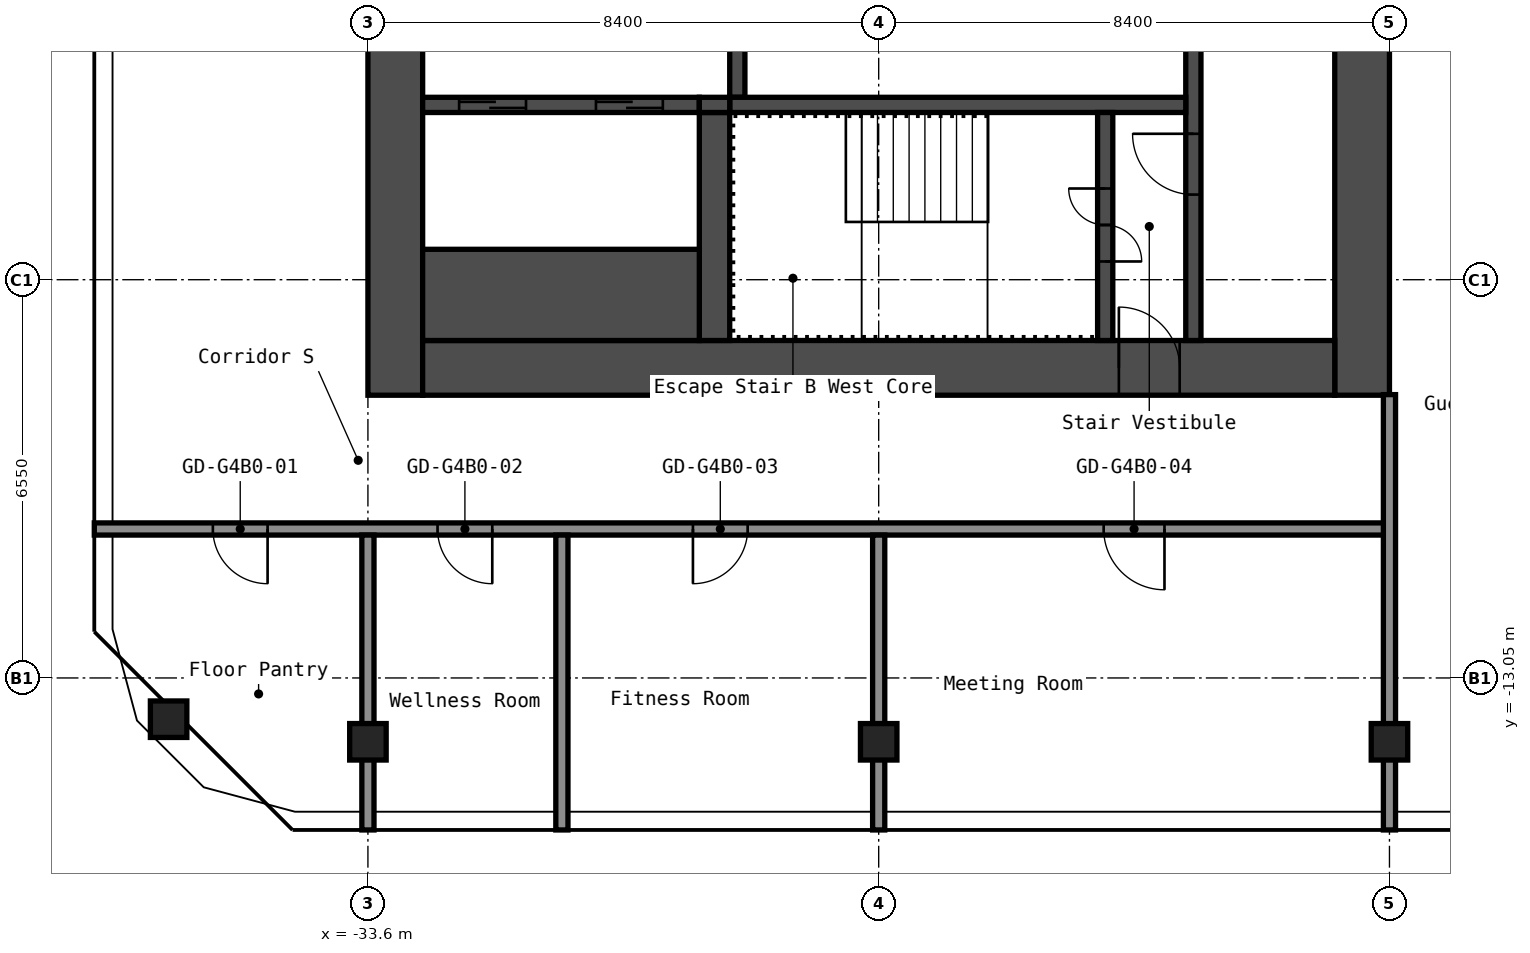
"""IFC4 building model, lengths in metres.
Left out: names, types, materials, properties, quantities, classifications, styles, units other than length and angle.
Written with IfcOpenShell. Run it as: python <this file> out.ifc"""

import sys

from ifc_helpers import new_model, si_unit, direction, frame, frame_2d, origin, origin_2d, place, context, subcontext, project, spatial, rectangle, hollow_rectangle, extrude, element, fill, save


model = new_model("IFC4")
c1 = context("Model", 3, precision=1e-05, world=origin(), true_north=direction((0.0, 1.0)))
c2 = subcontext(c1, "Body", "Model", "MODEL_VIEW")
j1 = project(units=[si_unit("LENGTHUNIT", "METRE"), si_unit("PLANEANGLEUNIT", "RADIAN")], contexts=[c1])
p1 = place(None, origin())
s1 = spatial("IfcSite", under=j1, at=p1, CompositionType="ELEMENT")
p2 = place(p1, origin())
s2 = spatial("IfcBuilding", under=s1, at=p2, CompositionType="ELEMENT")
p3 = place(p2, frame((0.0, 0.0, 189.8)))
s3 = spatial("IfcBuildingStorey", under=s2, at=p3, CompositionType="ELEMENT", Elevation=189.8)
for number, where, z_axis, x_axis in (
    (1, (-36.878, -13.729, 0.0), (0.0, 0.0, 1.0), (1.0, 0.0, 0.0)),
    (2, (-33.6, -14.1, 0.0), (0.0, 0.0, 1.0), (1.0, 0.0, 0.0)),
    (3, (-25.2, -14.1, 0.0), (0.0, 0.0, 1.0), (1.0, 0.0, 0.0)),
    (4, (-16.8, -14.1, 0.0), (0.0, 0.0, 1.0), (1.0, 0.0, 0.0)),
):
    element("IfcColumn", number, at=place(p3, frame(where, z_axis=z_axis, x_axis=x_axis)), inside=s3, PredefinedType="COLUMN", context=c2, shape_type="SweptSolid", body=[
        extrude(hollow_rectangle(XDim=0.6, YDim=0.6, WallThickness=0.025, InnerFilletRadius=0.038, OuterFilletRadius=0.062, at=origin_2d()), origin(), (0.0, 0.0, 1.0), 2.75),
    ])
p4 = place(p3, frame((-17.25, -8.4, 0.0), z_axis=(0.0, 0.0, 1.0), x_axis=(0.0, 1.0, 0.0)))
e5 = element("IfcWall", 5, at=p4, inside=s3, PredefinedType="SHEAR", context=c2, shape_type="SweptSolid", body=[
    extrude(rectangle(XDim=16.8, YDim=0.9, at=frame_2d((8.4, 0.0))), origin(), (0.0, 0.0, 1.0), 2.75),
])
p5 = place(p4, frame((10.1, 0.0, 0.0)))
e6 = element("IfcOpeningElement", 6, at=p5, cuts=e5, PredefinedType="OPENING", context=c2, shape_type="SweptSolid", body=[
    extrude(rectangle(XDim=1.6, YDim=2.1, at=frame_2d((0.8, 1.05))), frame((0.0, 0.46, 0.0), z_axis=(0.0, -1.0, 0.0), x_axis=(1.0, 0.0, 0.0)), (0.0, 0.0, 1.0), 0.92),
])
p6 = place(p3, frame((-33.15, -8.4, 0.0), z_axis=(0.0, 0.0, 1.0), x_axis=(0.0, 1.0, 0.0)))
e7 = element("IfcWall", 7, at=p6, inside=s3, PredefinedType="SHEAR", context=c2, shape_type="SweptSolid", body=[
    extrude(rectangle(XDim=16.8, YDim=0.9, at=frame_2d((8.4, 0.0))), origin(), (0.0, 0.0, 1.0), 2.75),
])
p7 = place(p3, frame((-32.7, -7.95, 0.0), z_axis=(0.0, 0.0, 1.0), x_axis=(1.0, 0.0, 0.0)))
e8 = element("IfcWall", 8, at=p7, inside=s3, PredefinedType="SHEAR", context=c2, shape_type="SweptSolid", body=[
    extrude(rectangle(XDim=15.0, YDim=0.9, at=frame_2d((7.5, 0.0))), origin(), (0.0, 0.0, 1.0), 2.75),
])
p8 = place(p7, frame((11.45, 0.0, 0.0)))
e9 = element("IfcOpeningElement", 9, at=p8, cuts=e8, PredefinedType="OPENING", context=c2, shape_type="SweptSolid", body=[
    extrude(rectangle(XDim=1.0, YDim=2.1, at=frame_2d((0.5, 1.05))), frame((0.0, 0.46, 0.0), z_axis=(0.0, -1.0, 0.0), x_axis=(1.0, 0.0, 0.0)), (0.0, 0.0, 1.0), 0.92),
])
p9 = place(p3, frame((-20.025, -7.5, 0.0), z_axis=(0.0, 0.0, 1.0), x_axis=(0.0, 1.0, 0.0)))
e10 = element("IfcWall", 10, at=p9, inside=s3, PredefinedType="SHEAR", context=c2, shape_type="SweptSolid", body=[
    extrude(rectangle(XDim=6.3, YDim=0.25, at=frame_2d((3.15, 0.0))), origin(), (0.0, 0.0, 1.0), 2.75),
])
p10 = place(p9, frame((2.4, 0.0, 0.0)))
e11 = element("IfcOpeningElement", 11, at=p10, cuts=e10, PredefinedType="OPENING", context=c2, shape_type="SweptSolid", body=[
    extrude(rectangle(XDim=1.0, YDim=2.1, at=frame_2d((0.5, 1.05))), frame((0.0, 0.135, 0.0), z_axis=(0.0, -1.0, 0.0), x_axis=(1.0, 0.0, 0.0)), (0.0, 0.0, 1.0), 0.27),
])
p11 = place(p3, frame((-27.525, -3.5, 0.0), z_axis=(0.0, 0.0, 1.0), x_axis=(0.0, 1.0, 0.0)))
e12 = element("IfcWall", 12, at=p11, inside=s3, PredefinedType="SHEAR", context=c2, shape_type="SweptSolid", body=[
    extrude(rectangle(XDim=2.05, YDim=0.25, at=frame_2d((1.025, 0.0))), origin(), (0.0, 0.0, 1.0), 2.75),
])
p12 = place(p3, frame((-27.65, -3.625, 0.0), z_axis=(0.0, 0.0, 1.0), x_axis=(1.0, 0.0, 0.0)))
e13 = element("IfcWall", 13, at=p12, inside=s3, PredefinedType="SHEAR", context=c2, shape_type="SweptSolid", body=[
    extrude(rectangle(XDim=7.5, YDim=0.25, at=frame_2d((3.75, 0.0))), origin(), (0.0, 0.0, 1.0), 2.75),
])
p13 = place(p3, frame((-21.475, -7.5, 0.0), z_axis=(0.0, 0.0, 1.0), x_axis=(0.0, 1.0, 0.0)))
e14 = element("IfcWall", 14, at=p13, inside=s3, PredefinedType="SHEAR", context=c2, shape_type="SweptSolid", body=[
    extrude(rectangle(XDim=3.75, YDim=0.25, at=frame_2d((1.875, 0.0))), origin(), (0.0, 0.0, 1.0), 2.75),
])
p14 = place(p13, frame((1.3, 0.0, 0.0)))
e15 = element("IfcOpeningElement", 15, at=p14, cuts=e14, PredefinedType="OPENING", context=c2, shape_type="SweptSolid", body=[
    extrude(rectangle(XDim=1.2, YDim=2.1, at=frame_2d((0.6, 1.05))), frame((0.0, 0.135, 0.0), z_axis=(0.0, -1.0, 0.0), x_axis=(1.0, 0.0, 0.0)), (0.0, 0.0, 1.0), 0.27),
])
p15 = place(p3, frame((-27.9, -7.5, 0.0), z_axis=(0.0, 0.0, 1.0), x_axis=(0.0, 1.0, 0.0)))
e16 = element("IfcWall", 16, at=p15, inside=s3, PredefinedType="SHEAR", context=c2, shape_type="SweptSolid", body=[
    extrude(rectangle(XDim=3.75, YDim=0.5, at=frame_2d((1.875, 0.0))), origin(), (0.0, 0.0, 1.0), 2.75),
])
p16 = place(p3, frame((-32.7, -3.625, 0.0), z_axis=(0.0, 0.0, 1.0), x_axis=(1.0, 0.0, 0.0)))
e17 = element("IfcWall", 17, at=p16, inside=s3, PredefinedType="SHEAR", context=c2, shape_type="SweptSolid", body=[
    extrude(rectangle(XDim=4.55, YDim=0.25, at=frame_2d((2.275, 0.0))), origin(), (0.0, 0.0, 1.0), 2.75),
])
p17 = place(p16, frame((2.85, 0.0, 0.0)))
e18 = element("IfcOpeningElement", 18, at=p17, cuts=e17, PredefinedType="OPENING", context=c2, shape_type="SweptSolid", body=[
    extrude(rectangle(XDim=1.1, YDim=2.1, at=frame_2d((0.55, 1.05))), frame((0.0, 0.135, 0.0), z_axis=(0.0, -1.0, 0.0), x_axis=(1.0, 0.0, 0.0)), (0.0, 0.0, 1.0), 0.27),
])
p18 = place(p16, frame((0.6, 0.0, 0.0)))
e19 = element("IfcOpeningElement", 19, at=p18, cuts=e17, PredefinedType="OPENING", context=c2, shape_type="SweptSolid", body=[
    extrude(rectangle(XDim=1.1, YDim=2.1, at=frame_2d((0.55, 1.05))), frame((0.0, 0.135, 0.0), z_axis=(0.0, -1.0, 0.0), x_axis=(1.0, 0.0, 0.0)), (0.0, 0.0, 1.0), 0.27),
])
p19 = place(p3, frame((-32.7, -6.75, 0.0), z_axis=(0.0, 0.0, 1.0), x_axis=(1.0, 0.0, 0.0)))
e20 = element("IfcWall", 20, at=p19, inside=s3, PredefinedType="SHEAR", context=c2, shape_type="SweptSolid", body=[
    extrude(rectangle(XDim=4.55, YDim=1.5, at=frame_2d((2.275, 0.0))), origin(), (0.0, 0.0, 1.0), 2.75),
])
p20 = place(p3, frame((-28.15, -3.625, 0.0), z_axis=(0.0, 0.0, 1.0), x_axis=(1.0, 0.0, 0.0)))
e21 = element("IfcWall", 21, at=p20, inside=s3, PredefinedType="SHEAR", context=c2, shape_type="SweptSolid", body=[
    extrude(rectangle(XDim=0.5, YDim=0.25, at=frame_2d((0.25, 0.0))), origin(), (0.0, 0.0, 1.0), 2.75),
])
p21 = place(p3, frame((-38.1, -10.6, 0.0), z_axis=(0.0, 0.0, 1.0), x_axis=(1.0, 0.0, 0.0)))
e22 = element("IfcWall", 22, at=p21, inside=s3, PredefinedType="PARTITIONING", context=c2, shape_type="SweptSolid", body=[
    extrude(rectangle(XDim=21.3, YDim=0.2, at=frame_2d((10.65, 0.0))), origin(), (0.0, 0.0, 1.0), 2.75),
])
p22 = place(p21, frame((1.95, 0.0, 0.0)))
e23 = element("IfcOpeningElement", 23, at=p22, cuts=e22, PredefinedType="OPENING", context=c2, shape_type="SweptSolid", body=[
    extrude(rectangle(XDim=0.9, YDim=2.1, at=frame_2d((0.45, 1.05))), frame((0.0, 0.11, 0.0), z_axis=(0.0, -1.0, 0.0), x_axis=(1.0, 0.0, 0.0)), (0.0, 0.0, 1.0), 0.22),
])
p23 = place(p21, frame((5.645, 0.0, 0.0)))
e24 = element("IfcOpeningElement", 24, at=p23, cuts=e22, PredefinedType="OPENING", context=c2, shape_type="SweptSolid", body=[
    extrude(rectangle(XDim=0.9, YDim=2.1, at=frame_2d((0.45, 1.05))), frame((0.0, 0.11, 0.0), z_axis=(0.0, -1.0, 0.0), x_axis=(1.0, 0.0, 0.0)), (0.0, 0.0, 1.0), 0.22),
])
p24 = place(p21, frame((9.845, 0.0, 0.0)))
e25 = element("IfcOpeningElement", 25, at=p24, cuts=e22, PredefinedType="OPENING", context=c2, shape_type="SweptSolid", body=[
    extrude(rectangle(XDim=0.9, YDim=2.1, at=frame_2d((0.45, 1.05))), frame((0.0, 0.11, 0.0), z_axis=(0.0, -1.0, 0.0), x_axis=(1.0, 0.0, 0.0)), (0.0, 0.0, 1.0), 0.22),
])
p25 = place(p21, frame((16.6, 0.0, 0.0)))
e26 = element("IfcOpeningElement", 26, at=p25, cuts=e22, PredefinedType="OPENING", context=c2, shape_type="SweptSolid", body=[
    extrude(rectangle(XDim=1.0, YDim=2.1, at=frame_2d((0.5, 1.05))), frame((0.0, 0.11, 0.0), z_axis=(0.0, -1.0, 0.0), x_axis=(1.0, 0.0, 0.0)), (0.0, 0.0, 1.0), 0.22),
])
for number, where, z_axis, x_axis in (
    (27, (-33.6, -15.55, 0.0), (0.0, 0.0, 1.0), (0.0, 1.0, 0.0)),
    (28, (-30.41, -15.55, 0.0), (0.0, 0.0, 1.0), (0.0, 1.0, 0.0)),
    (29, (-25.2, -15.55, 0.0), (0.0, 0.0, 1.0), (0.0, 1.0, 0.0)),
):
    element("IfcWall", number, at=place(p3, frame(where, z_axis=z_axis, x_axis=x_axis)), inside=s3, PredefinedType="PARTITIONING", context=c2, shape_type="SweptSolid", body=[
        extrude(rectangle(XDim=4.85, YDim=0.2, at=frame_2d((2.425, 0.0))), origin(), (0.0, 0.0, 1.0), 2.75),
    ])
p26 = place(p3, frame((-16.8, -15.55, 0.0), z_axis=(0.0, 0.0, 1.0), x_axis=(0.0, 1.0, 0.0)))
e30 = element("IfcWall", 30, at=p26, inside=s3, PredefinedType="PARTITIONING", context=c2, shape_type="SweptSolid", body=[
    extrude(rectangle(XDim=7.16, YDim=0.2, at=frame_2d((3.58, 0.0))), origin(), (0.0, 0.0, 1.0), 2.75),
])
p27 = place(p8, origin())
e31 = element("IfcDoor", 31, at=p27, inside=s3, OperationType="SINGLE_SWING_RIGHT", PredefinedType="DOOR", context=c2, shape_type="SweptSolid", body=[
    extrude(rectangle(XDim=1.0, YDim=2.1, at=frame_2d((0.5, 1.05))), frame((0.0, 0.025, 0.0), z_axis=(0.0, -1.0, 0.0), x_axis=(1.0, 0.0, 0.0)), (0.0, 0.0, 1.0), 0.05),
])
fill(e9, e31)
p28 = place(p14, origin())
e32 = element("IfcDoor", 32, at=p28, inside=s3, OperationType="DOUBLE_DOOR_SINGLE_SWING", PredefinedType="DOOR", context=c2, shape_type="SweptSolid", body=[
    extrude(rectangle(XDim=1.2, YDim=2.1, at=frame_2d((0.6, 1.05))), frame((0.0, 0.025, 0.0), z_axis=(0.0, -1.0, 0.0), x_axis=(1.0, 0.0, 0.0)), (0.0, 0.0, 1.0), 0.05),
])
fill(e15, e32)
p29 = place(p10, origin())
e33 = element("IfcDoor", 33, at=p29, inside=s3, OperationType="SINGLE_SWING_LEFT", PredefinedType="DOOR", context=c2, shape_type="SweptSolid", body=[
    extrude(rectangle(XDim=1.0, YDim=2.1, at=frame_2d((0.5, 1.05))), frame((0.0, 0.025, 0.0), z_axis=(0.0, -1.0, 0.0), x_axis=(1.0, 0.0, 0.0)), (0.0, 0.0, 1.0), 0.05),
])
fill(e11, e33)
p30 = place(p17, origin())
e34 = element("IfcDoor", 34, at=p30, inside=s3, OperationType="DOUBLE_DOOR_SLIDING", PredefinedType="DOOR", context=c2, shape_type="SweptSolid", body=[
    extrude(rectangle(XDim=1.1, YDim=2.1, at=frame_2d((0.55, 1.05))), frame((0.0, 0.025, 0.0), z_axis=(0.0, -1.0, 0.0), x_axis=(1.0, 0.0, 0.0)), (0.0, 0.0, 1.0), 0.05),
])
fill(e18, e34)
p31 = place(p18, origin())
e35 = element("IfcDoor", 35, at=p31, inside=s3, OperationType="DOUBLE_DOOR_SLIDING", PredefinedType="DOOR", context=c2, shape_type="SweptSolid", body=[
    extrude(rectangle(XDim=1.1, YDim=2.1, at=frame_2d((0.55, 1.05))), frame((0.0, 0.025, 0.0), z_axis=(0.0, -1.0, 0.0), x_axis=(1.0, 0.0, 0.0)), (0.0, 0.0, 1.0), 0.05),
])
fill(e19, e35)
p32 = place(p22, origin())
e36 = element("IfcDoor", 36, at=p32, inside=s3, OperationType="SINGLE_SWING_RIGHT", PredefinedType="DOOR", context=c2, shape_type="SweptSolid", body=[
    extrude(rectangle(XDim=0.9, YDim=2.1, at=frame_2d((0.45, 1.05))), frame((0.0, 0.025, 0.0), z_axis=(0.0, -1.0, 0.0), x_axis=(1.0, 0.0, 0.0)), (0.0, 0.0, 1.0), 0.05),
])
fill(e23, e36)
p33 = place(p23, origin())
e37 = element("IfcDoor", 37, at=p33, inside=s3, OperationType="SINGLE_SWING_RIGHT", PredefinedType="DOOR", context=c2, shape_type="SweptSolid", body=[
    extrude(rectangle(XDim=0.9, YDim=2.1, at=frame_2d((0.45, 1.05))), frame((0.0, 0.025, 0.0), z_axis=(0.0, -1.0, 0.0), x_axis=(1.0, 0.0, 0.0)), (0.0, 0.0, 1.0), 0.05),
])
fill(e24, e37)
p34 = place(p24, origin())
e38 = element("IfcDoor", 38, at=p34, inside=s3, OperationType="SINGLE_SWING_LEFT", PredefinedType="DOOR", context=c2, shape_type="SweptSolid", body=[
    extrude(rectangle(XDim=0.9, YDim=2.1, at=frame_2d((0.45, 1.05))), frame((0.0, 0.025, 0.0), z_axis=(0.0, -1.0, 0.0), x_axis=(1.0, 0.0, 0.0)), (0.0, 0.0, 1.0), 0.05),
])
fill(e25, e38)
p35 = place(p25, origin())
e39 = element("IfcDoor", 39, at=p35, inside=s3, OperationType="SINGLE_SWING_RIGHT", PredefinedType="DOOR", context=c2, shape_type="SweptSolid", body=[
    extrude(rectangle(XDim=1.0, YDim=2.1, at=frame_2d((0.5, 1.05))), frame((0.0, 0.025, 0.0), z_axis=(0.0, -1.0, 0.0), x_axis=(1.0, 0.0, 0.0)), (0.0, 0.0, 1.0), 0.05),
])
fill(e26, e39)
save(model, sys.argv[1])
